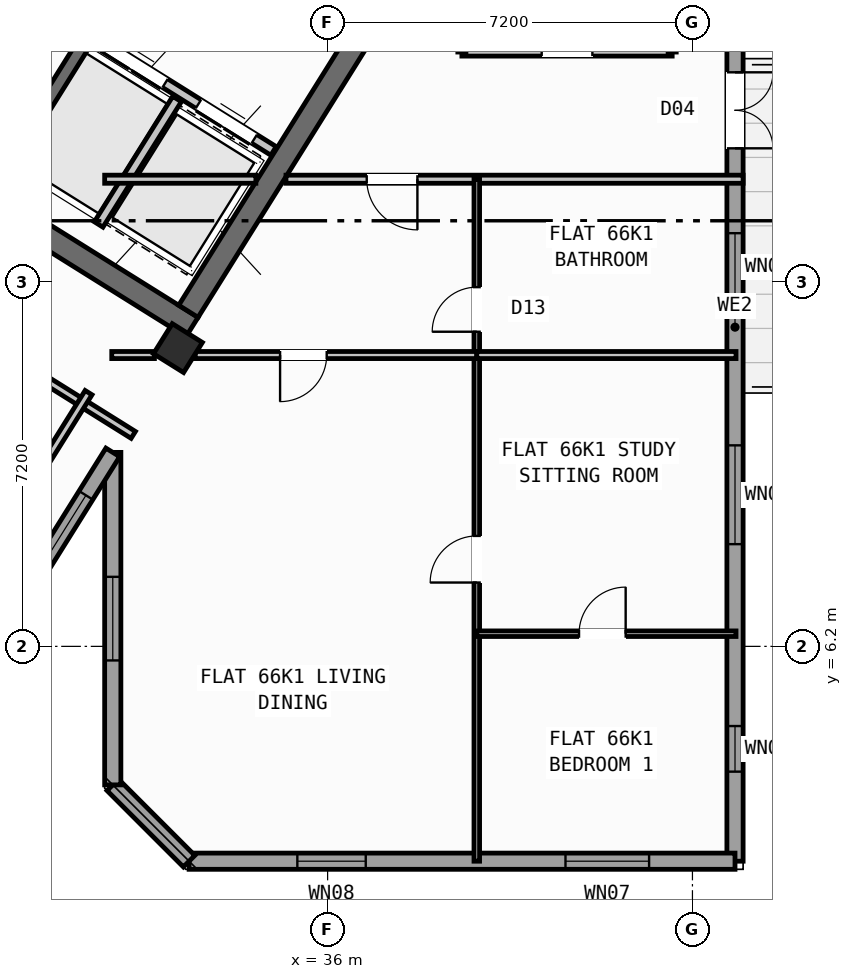
"""IFC4 building model, lengths in metres.
Left out: names, types, materials, properties, quantities, classifications, styles, units other than length and angle.
Written with IfcOpenShell. Run it as: python <this file> out.ifc"""

import sys

from ifc_helpers import new_model, si_unit, direction, frame, frame_2d, origin, origin_2d, place, context, subcontext, project, spatial, rectangle, hollow_rectangle, extrude, source, transform, mapped, element, fill, save


model = new_model("IFC4")
c1 = context("Model", 3, precision=1e-05, world=origin(), true_north=direction((0.0, 1.0)))
c2 = subcontext(c1, "Body", "Model", "MODEL_VIEW")
j1 = project(units=[si_unit("LENGTHUNIT", "METRE"), si_unit("PLANEANGLEUNIT", "RADIAN")], contexts=[c1])
p1 = place(None, origin())
s1 = spatial("IfcSite", under=j1, at=p1, CompositionType="ELEMENT")
p2 = place(p1, origin())
s2 = spatial("IfcBuilding", under=s1, at=p2, CompositionType="ELEMENT")
p3 = place(p2, frame((0.0, 0.0, 262.8)))
s3 = spatial("IfcBuildingStorey", under=s2, at=p3, CompositionType="ELEMENT", Elevation=262.8)
p4 = place(p3, frame((33.324, 12.503, 0.0), z_axis=(0.0, 0.0, 1.0), x_axis=(-0.848043529849, 0.529926571782, 0.0)))
e1 = element("IfcWall", 1, at=p4, inside=s3, PredefinedType="SHEAR", context=c2, shape_type="SweptSolid", body=[
    extrude(rectangle(XDim=13.04, YDim=0.45, at=frame_2d((6.52, 0.0))), origin(), (0.0, 0.0, 1.0), 3.35),
])
p5 = place(p3, frame((36.683, 18.304, 0.0), z_axis=(0.0, 0.0, 1.0), x_axis=(-0.529904039071, -0.848057609704, 0.0)))
e2 = element("IfcWall", 2, at=p5, inside=s3, PredefinedType="SHEAR", context=c2, shape_type="SweptSolid", body=[
    extrude(rectangle(XDim=6.475, YDim=0.45, at=frame_2d((3.238, 0.0))), origin(), (0.0, 0.0, 1.0), 3.35),
])
m1 = source(origin(), c2, "Body", "SweptSolid", [
    extrude(hollow_rectangle(XDim=0.7, YDim=0.7, WallThickness=0.028, at=origin_2d()), origin(), (0.0, 0.0, 1.0), 3.6),
])
p6 = place(p3, frame((33.046, 12.087, 0.0), z_axis=(0.0, 0.0, 1.0), x_axis=(-0.848048096156, 0.529919264233, 0.0)))
e3 = element("IfcColumn", 3, at=p6, inside=s3, PredefinedType="COLUMN", context=c2, shape_type="MappedRepresentation", body=[
    mapped(m1, transform((0.0, 0.0, 0.0), scale=1.0)),
])
p7 = place(p3, frame((44.04, 23.04, 0.0), z_axis=(0.0, 0.0, 1.0), x_axis=(0.0, -1.0, 0.0)))
e4 = element("IfcWall", 4, at=p7, inside=s3, PredefinedType="STANDARD", context=c2, shape_type="SweptSolid", body=[
    extrude(rectangle(XDim=21.08, YDim=0.32, at=frame_2d((10.54, 0.0))), origin(), (0.0, 0.0, 1.0), 3.35),
])
p8 = place(p7, frame((5.51, 0.0, 0.0)))
e5 = element("IfcOpeningElement", 5, at=p8, cuts=e4, PredefinedType="OPENING", context=c2, shape_type="SweptSolid", body=[
    extrude(rectangle(XDim=1.5, YDim=2.25, at=frame_2d((0.75, 1.125))), frame((0.0, 0.17, 0.0), z_axis=(0.0, -1.0, 0.0), x_axis=(1.0, 0.0, 0.0)), (0.0, 0.0, 1.0), 0.34),
])
p9 = place(p7, frame((1.995, 0.0, 0.9)))
e6 = element("IfcOpeningElement", 6, at=p9, cuts=e4, PredefinedType="OPENING", context=c2, shape_type="SweptSolid", body=[
    extrude(rectangle(XDim=1.65, YDim=1.45, at=frame_2d((0.825, 0.725))), frame((0.0, 0.17, 0.0), z_axis=(0.0, -1.0, 0.0), x_axis=(1.0, 0.0, 0.0)), (0.0, 0.0, 1.0), 0.34),
])
p10 = place(p7, frame((8.685, 0.0, 0.9)))
e7 = element("IfcOpeningElement", 7, at=p10, cuts=e4, PredefinedType="OPENING", context=c2, shape_type="SweptSolid", body=[
    extrude(rectangle(XDim=1.35, YDim=1.45, at=frame_2d((0.675, 0.725))), frame((0.0, 0.17, 0.0), z_axis=(0.0, -1.0, 0.0), x_axis=(1.0, 0.0, 0.0)), (0.0, 0.0, 1.0), 0.34),
])
p11 = place(p7, frame((12.873, 0.0, 0.95)))
e8 = element("IfcOpeningElement", 8, at=p11, cuts=e4, PredefinedType="OPENING", context=c2, shape_type="SweptSolid", body=[
    extrude(rectangle(XDim=1.95, YDim=1.35, at=frame_2d((0.975, 0.675))), frame((0.0, 0.17, 0.0), z_axis=(0.0, -1.0, 0.0), x_axis=(1.0, 0.0, 0.0)), (0.0, 0.0, 1.0), 0.34),
])
p12 = place(p7, frame((18.413, 0.0, 1.0)))
e9 = element("IfcOpeningElement", 9, at=p12, cuts=e4, PredefinedType="OPENING", context=c2, shape_type="SweptSolid", body=[
    extrude(rectangle(XDim=0.9, YDim=1.25, at=frame_2d((0.45, 0.625))), frame((0.0, 0.17, 0.0), z_axis=(0.0, -1.0, 0.0), x_axis=(1.0, 0.0, 0.0)), (0.0, 0.0, 1.0), 0.34),
])
p13 = place(p3, frame((44.04, 1.96, 0.0), z_axis=(0.0, 0.0, 1.0), x_axis=(-1.0, 0.0, 0.0)))
e10 = element("IfcWall", 10, at=p13, inside=s3, PredefinedType="STANDARD", context=c2, shape_type="SweptSolid", body=[
    extrude(rectangle(XDim=10.774, YDim=0.32, at=frame_2d((5.387, 0.0))), origin(), (0.0, 0.0, 1.0), 3.35),
])
p14 = place(p13, frame((1.696, 0.0, 0.9)))
e11 = element("IfcOpeningElement", 11, at=p14, cuts=e10, PredefinedType="OPENING", context=c2, shape_type="SweptSolid", body=[
    extrude(rectangle(XDim=1.65, YDim=1.45, at=frame_2d((0.825, 0.725))), frame((0.0, 0.17, 0.0), z_axis=(0.0, -1.0, 0.0), x_axis=(1.0, 0.0, 0.0)), (0.0, 0.0, 1.0), 0.34),
])
p15 = place(p13, frame((7.287, 0.0, 0.9)))
e12 = element("IfcOpeningElement", 12, at=p15, cuts=e10, PredefinedType="OPENING", context=c2, shape_type="SweptSolid", body=[
    extrude(rectangle(XDim=1.35, YDim=1.45, at=frame_2d((0.675, 0.725))), frame((0.0, 0.17, 0.0), z_axis=(0.0, -1.0, 0.0), x_axis=(1.0, 0.0, 0.0)), (0.0, 0.0, 1.0), 0.34),
])
p16 = place(p3, frame((33.266, 1.96, 0.0), z_axis=(0.0, 0.0, 1.0), x_axis=(-0.707106781187, 0.707106781187, 0.0)))
e13 = element("IfcWall", 13, at=p16, inside=s3, PredefinedType="STANDARD", context=c2, shape_type="SweptSolid", body=[
    extrude(rectangle(XDim=2.13, YDim=0.32, at=frame_2d((1.065, 0.0))), origin(), (0.0, 0.0, 1.0), 3.35),
])
p17 = place(p3, frame((31.76, 3.466, 0.0), z_axis=(0.0, 0.0, 1.0), x_axis=(0.0, 1.0, 0.0)))
e14 = element("IfcWall", 14, at=p17, inside=s3, PredefinedType="STANDARD", context=c2, shape_type="SweptSolid", body=[
    extrude(rectangle(XDim=6.562, YDim=0.32, at=frame_2d((3.281, 0.0))), origin(), (0.0, 0.0, 1.0), 3.35),
])
p18 = place(p17, frame((2.456, 0.0, 0.9)))
e15 = element("IfcOpeningElement", 15, at=p18, cuts=e14, PredefinedType="OPENING", context=c2, shape_type="SweptSolid", body=[
    extrude(rectangle(XDim=1.65, YDim=1.45, at=frame_2d((0.825, 0.725))), frame((0.0, 0.17, 0.0), z_axis=(0.0, -1.0, 0.0), x_axis=(1.0, 0.0, 0.0)), (0.0, 0.0, 1.0), 0.34),
])
p19 = place(p3, frame((31.76, 10.029, 0.0), z_axis=(0.0, 0.0, 1.0), x_axis=(-0.529930468064, -0.848041095123, 0.0)))
e16 = element("IfcWall", 16, at=p19, inside=s3, PredefinedType="STANDARD", context=c2, shape_type="SweptSolid", body=[
    extrude(rectangle(XDim=4.167, YDim=0.32, at=frame_2d((2.083, 0.0))), origin(), (0.0, 0.0, 1.0), 2.875),
])
p20 = place(p19, frame((0.999, 0.0, 0.9)))
e17 = element("IfcOpeningElement", 17, at=p20, cuts=e16, PredefinedType="OPENING", context=c2, shape_type="SweptSolid", body=[
    extrude(rectangle(XDim=1.65, YDim=1.45, at=frame_2d((0.825, 0.725))), frame((0.0, 0.17, 0.0), z_axis=(0.0, -1.0, 0.0), x_axis=(1.0, 0.0, 0.0)), (0.0, 0.0, 1.0), 0.34),
])
p21 = place(p3, frame((31.288, 18.256, 0.0), z_axis=(0.0, 0.0, 1.0), x_axis=(-0.529943379326, -0.848033026897, 0.0)))
e18 = element("IfcWall", 18, at=p21, inside=s3, PredefinedType="SHEAR", context=c2, shape_type="SweptSolid", body=[
    extrude(rectangle(XDim=3.16, YDim=0.26, at=frame_2d((1.58, 0.0))), origin(), (0.0, 0.0, 1.0), 3.35),
])
p22 = place(p3, frame((34.933, 15.978, 0.0), z_axis=(0.0, 0.0, 1.0), x_axis=(-0.848055739377, 0.529907032327, 0.0)))
e19 = element("IfcWall", 19, at=p22, inside=s3, PredefinedType="STANDARD", context=c2, shape_type="SweptSolid", body=[
    extrude(rectangle(XDim=4.298, YDim=0.2, at=frame_2d((2.149, 0.0))), origin(), (0.0, 0.0, 1.0), 3.34),
])
p23 = place(p22, frame((0.448, 0.0, 0.0)))
e20 = element("IfcOpeningElement", 20, at=p23, cuts=e19, PredefinedType="OPENING", context=c2, shape_type="SweptSolid", body=[
    extrude(rectangle(XDim=1.3, YDim=2.2, at=frame_2d((0.65, 1.1))), frame((0.0, 0.11, 0.0), z_axis=(0.0, -1.0, 0.0), x_axis=(1.0, 0.0, 0.0)), (0.0, 0.0, 1.0), 0.22),
])
p24 = place(p22, frame((2.523, 0.0, 0.0)))
e21 = element("IfcOpeningElement", 21, at=p24, cuts=e19, PredefinedType="OPENING", context=c2, shape_type="SweptSolid", body=[
    extrude(rectangle(XDim=1.45, YDim=2.25, at=frame_2d((0.725, 1.125))), frame((0.0, 0.11, 0.0), z_axis=(0.0, -1.0, 0.0), x_axis=(1.0, 0.0, 0.0)), (0.0, 0.0, 1.0), 0.22),
])
p25 = place(p3, frame((33.029, 17.003, 0.0), z_axis=(0.0, 0.0, 1.0), x_axis=(-0.529916267533, -0.848049968695, 0.0)))
e22 = element("IfcWall", 22, at=p25, inside=s3, PredefinedType="STANDARD", context=c2, shape_type="SweptSolid", body=[
    extrude(rectangle(XDim=2.92, YDim=0.2, at=frame_2d((1.46, 0.0))), origin(), (0.0, 0.0, 1.0), 3.34),
])
p26 = place(p3, frame((32.164, 10.374, 0.0), z_axis=(0.0, 0.0, 1.0), x_axis=(-0.848044107957, 0.529925646633, 0.0)))
e23 = element("IfcWall", 23, at=p26, inside=s3, PredefinedType="PARTITIONING", context=c2, shape_type="SweptSolid", body=[
    extrude(rectangle(XDim=15.57, YDim=0.16, at=frame_2d((7.785, 0.0))), origin(), (0.0, 0.0, 1.0), 3.34),
])
p27 = place(p26, frame((10.83, 0.0, 0.0)))
e24 = element("IfcOpeningElement", 24, at=p27, cuts=e23, PredefinedType="OPENING", context=c2, shape_type="SweptSolid", body=[
    extrude(rectangle(XDim=1.0, YDim=2.1, at=frame_2d((0.5, 1.05))), frame((0.0, 0.09, 0.0), z_axis=(0.0, -1.0, 0.0), x_axis=(1.0, 0.0, 0.0)), (0.0, 0.0, 1.0), 0.18),
])
p28 = place(p3, frame((31.282, 11.208, 0.0), z_axis=(0.0, 0.0, 1.0), x_axis=(-0.529938869374, -0.84803584519, 0.0)))
e25 = element("IfcWall", 25, at=p28, inside=s3, PredefinedType="PARTITIONING", context=c2, shape_type="SweptSolid", body=[
    extrude(rectangle(XDim=5.48, YDim=0.16, at=frame_2d((2.74, 0.0))), origin(), (0.0, 0.0, 1.0), 3.34),
])
p29 = place(p3, frame((31.6, 15.42, 0.0), z_axis=(0.0, 0.0, 1.0), x_axis=(1.0, 0.0, 0.0)))
e26 = element("IfcWall", 26, at=p29, inside=s3, PredefinedType="PARTITIONING", context=c2, shape_type="SweptSolid", body=[
    extrude(rectangle(XDim=2.984, YDim=0.16, at=frame_2d((1.492, 0.0))), origin(), (0.0, 0.0, 1.0), 3.34),
])
p30 = place(p3, frame((35.178, 15.42, 0.0), z_axis=(0.0, 0.0, 1.0), x_axis=(1.0, 0.0, 0.0)))
e27 = element("IfcWall", 27, at=p30, inside=s3, PredefinedType="PARTITIONING", context=c2, shape_type="SweptSolid", body=[
    extrude(rectangle(XDim=9.021, YDim=0.16, at=frame_2d((4.511, 0.0))), origin(), (0.0, 0.0, 1.0), 3.34),
])
p31 = place(p30, frame((1.594, 0.0, 0.0)))
e28 = element("IfcOpeningElement", 28, at=p31, cuts=e27, PredefinedType="OPENING", context=c2, shape_type="SweptSolid", body=[
    extrude(rectangle(XDim=1.0, YDim=2.1, at=frame_2d((0.5, 1.05))), frame((0.0, 0.09, 0.0), z_axis=(0.0, -1.0, 0.0), x_axis=(1.0, 0.0, 0.0)), (0.0, 0.0, 1.0), 0.18),
])
p32 = place(p3, frame((38.65, 17.93, 0.0), z_axis=(0.0, 0.0, 1.0), x_axis=(1.0, 0.0, 0.0)))
e29 = element("IfcWall", 29, at=p32, inside=s3, PredefinedType="PARTITIONING", context=c2, shape_type="SweptSolid", body=[
    extrude(rectangle(XDim=4.15, YDim=0.16, at=frame_2d((2.075, 0.0))), origin(), (0.0, 0.0, 1.0), 3.34),
])
p33 = place(p32, frame((1.575, 0.0, 0.0)))
e30 = element("IfcOpeningElement", 30, at=p33, cuts=e29, PredefinedType="OPENING", context=c2, shape_type="SweptSolid", body=[
    extrude(rectangle(XDim=1.0, YDim=2.1, at=frame_2d((0.5, 1.05))), frame((0.0, 0.09, 0.0), z_axis=(0.0, -1.0, 0.0), x_axis=(1.0, 0.0, 0.0)), (0.0, 0.0, 1.0), 0.18),
])
p34 = place(p3, frame((38.944, 1.96, 0.0), z_axis=(0.0, 0.0, 1.0), x_axis=(0.0, 1.0, 0.0)))
e31 = element("IfcWall", 31, at=p34, inside=s3, PredefinedType="PARTITIONING", context=c2, shape_type="SweptSolid", body=[
    extrude(rectangle(XDim=13.46, YDim=0.11, at=frame_2d((6.73, 0.0))), origin(), (0.0, 0.0, 1.0), 3.34),
])
p35 = place(p34, frame((5.5, 0.0, 0.0)))
e32 = element("IfcOpeningElement", 32, at=p35, cuts=e31, PredefinedType="OPENING", context=c2, shape_type="SweptSolid", body=[
    extrude(rectangle(XDim=0.92, YDim=2.08, at=frame_2d((0.46, 1.04))), frame((0.0, 0.065, 0.0), z_axis=(0.0, -1.0, 0.0), x_axis=(1.0, 0.0, 0.0)), (0.0, 0.0, 1.0), 0.13),
])
p36 = place(p34, frame((10.45, 0.0, 0.0)))
e33 = element("IfcOpeningElement", 33, at=p36, cuts=e31, PredefinedType="OPENING", context=c2, shape_type="SweptSolid", body=[
    extrude(rectangle(XDim=0.88, YDim=2.08, at=frame_2d((0.44, 1.04))), frame((0.0, 0.065, 0.0), z_axis=(0.0, -1.0, 0.0), x_axis=(1.0, 0.0, 0.0)), (0.0, 0.0, 1.0), 0.13),
])
p37 = place(p3, frame((31.74, 11.95, 0.0), z_axis=(0.0, 0.0, 1.0), x_axis=(1.0, 0.0, 0.0)))
e34 = element("IfcWall", 34, at=p37, inside=s3, PredefinedType="PLUMBINGWALL", context=c2, shape_type="SweptSolid", body=[
    extrude(rectangle(XDim=0.842, YDim=0.14, at=frame_2d((0.421, 0.0))), origin(), (0.0, 0.0, 1.0), 3.34),
])
p38 = place(p3, frame((33.387, 11.95, 0.0), z_axis=(0.0, 0.0, 1.0), x_axis=(1.0, 0.0, 0.0)))
e35 = element("IfcWall", 35, at=p38, inside=s3, PredefinedType="PLUMBINGWALL", context=c2, shape_type="SweptSolid", body=[
    extrude(rectangle(XDim=5.557, YDim=0.14, at=frame_2d((2.778, 0.0))), origin(), (0.0, 0.0, 1.0), 3.34),
])
p39 = place(p38, frame((1.675, 0.0, 0.0)))
e36 = element("IfcOpeningElement", 36, at=p39, cuts=e35, PredefinedType="OPENING", context=c2, shape_type="SweptSolid", body=[
    extrude(rectangle(XDim=0.92, YDim=2.08, at=frame_2d((0.46, 1.04))), frame((0.0, 0.08, 0.0), z_axis=(0.0, -1.0, 0.0), x_axis=(1.0, 0.0, 0.0)), (0.0, 0.0, 1.0), 0.16),
])
p40 = place(p3, frame((38.944, 11.95, 0.0), z_axis=(0.0, 0.0, 1.0), x_axis=(1.0, 0.0, 0.0)))
e37 = element("IfcWall", 37, at=p40, inside=s3, PredefinedType="PLUMBINGWALL", context=c2, shape_type="SweptSolid", body=[
    extrude(rectangle(XDim=5.116, YDim=0.14, at=frame_2d((2.558, 0.0))), origin(), (0.0, 0.0, 1.0), 3.34),
])
p41 = place(p3, frame((38.944, 6.45, 0.0), z_axis=(0.0, 0.0, 1.0), x_axis=(1.0, 0.0, 0.0)))
e38 = element("IfcWall", 38, at=p41, inside=s3, PredefinedType="PARTITIONING", context=c2, shape_type="SweptSolid", body=[
    extrude(rectangle(XDim=5.116, YDim=0.11, at=frame_2d((2.558, 0.0))), origin(), (0.0, 0.0, 1.0), 3.34),
])
p42 = place(p41, frame((2.018, 0.0, 0.0)))
e39 = element("IfcOpeningElement", 39, at=p42, cuts=e38, PredefinedType="OPENING", context=c2, shape_type="SweptSolid", body=[
    extrude(rectangle(XDim=0.92, YDim=2.08, at=frame_2d((0.46, 1.04))), frame((0.0, 0.065, 0.0), z_axis=(0.0, -1.0, 0.0), x_axis=(1.0, 0.0, 0.0)), (0.0, 0.0, 1.0), 0.13),
])
m2 = source(origin(), c2, "Body", "SweptSolid", [
    extrude(rectangle(XDim=1.5, YDim=2.25, at=frame_2d((0.75, 1.125))), frame((0.0, 0.025, 0.0), z_axis=(0.0, -1.0, 0.0), x_axis=(1.0, 0.0, 0.0)), (0.0, 0.0, 1.0), 0.05),
])
p43 = place(p8, origin())
e40 = element("IfcDoor", 40, at=p43, inside=s3, OperationType="DOUBLE_DOOR_SINGLE_SWING", PredefinedType="DOOR", context=c2, shape_type="MappedRepresentation", body=[
    mapped(m2, transform((0.0, 0.0, 0.0), scale=1.0)),
])
fill(e5, e40)
m3 = source(origin(), c2, "Body", "SweptSolid", [
    extrude(rectangle(XDim=1.35, YDim=1.45, at=frame_2d((0.675, 0.725))), frame((0.0, 0.03, 0.0), z_axis=(0.0, -1.0, 0.0), x_axis=(1.0, 0.0, 0.0)), (0.0, 0.0, 1.0), 0.06),
])
p44 = place(p10, origin())
e41 = element("IfcWindow", 41, at=p44, inside=s3, PartitioningType="SINGLE_PANEL", PredefinedType="WINDOW", context=c2, shape_type="MappedRepresentation", body=[
    mapped(m3, transform((0.0, 0.0, 0.0), scale=1.0)),
])
fill(e7, e41)
m4 = source(origin(), c2, "Body", "SweptSolid", [
    extrude(rectangle(XDim=1.95, YDim=1.35, at=frame_2d((0.975, 0.675))), frame((0.0, 0.03, 0.0), z_axis=(0.0, -1.0, 0.0), x_axis=(1.0, 0.0, 0.0)), (0.0, 0.0, 1.0), 0.06),
])
p45 = place(p11, origin())
e42 = element("IfcWindow", 42, at=p45, inside=s3, PartitioningType="SINGLE_PANEL", PredefinedType="WINDOW", context=c2, shape_type="MappedRepresentation", body=[
    mapped(m4, transform((0.0, 0.0, 0.0), scale=1.0)),
])
fill(e8, e42)
m5 = source(origin(), c2, "Body", "SweptSolid", [
    extrude(rectangle(XDim=0.9, YDim=1.25, at=frame_2d((0.45, 0.625))), frame((0.0, 0.03, 0.0), z_axis=(0.0, -1.0, 0.0), x_axis=(1.0, 0.0, 0.0)), (0.0, 0.0, 1.0), 0.06),
])
p46 = place(p12, origin())
e43 = element("IfcWindow", 43, at=p46, inside=s3, PartitioningType="SINGLE_PANEL", PredefinedType="WINDOW", context=c2, shape_type="MappedRepresentation", body=[
    mapped(m5, transform((0.0, 0.0, 0.0), scale=1.0)),
])
fill(e9, e43)
m6 = source(origin(), c2, "Body", "SweptSolid", [
    extrude(rectangle(XDim=1.65, YDim=1.45, at=frame_2d((0.825, 0.725))), frame((0.0, 0.03, 0.0), z_axis=(0.0, -1.0, 0.0), x_axis=(1.0, 0.0, 0.0)), (0.0, 0.0, 1.0), 0.06),
])
p47 = place(p14, origin())
e44 = element("IfcWindow", 44, at=p47, inside=s3, PartitioningType="SINGLE_PANEL", PredefinedType="WINDOW", context=c2, shape_type="MappedRepresentation", body=[
    mapped(m6, transform((0.0, 0.0, 0.0), scale=1.0)),
])
fill(e11, e44)
p48 = place(p15, origin())
e45 = element("IfcWindow", 45, at=p48, inside=s3, PartitioningType="SINGLE_PANEL", PredefinedType="WINDOW", context=c2, shape_type="MappedRepresentation", body=[
    mapped(m3, transform((0.0, 0.0, 0.0), scale=1.0)),
])
fill(e12, e45)
p49 = place(p18, origin())
e46 = element("IfcWindow", 46, at=p49, inside=s3, PartitioningType="SINGLE_PANEL", PredefinedType="WINDOW", context=c2, shape_type="MappedRepresentation", body=[
    mapped(m6, transform((0.0, 0.0, 0.0), scale=1.0)),
])
fill(e15, e46)
p50 = place(p20, origin())
e47 = element("IfcWindow", 47, at=p50, inside=s3, PartitioningType="SINGLE_PANEL", PredefinedType="WINDOW", context=c2, shape_type="MappedRepresentation", body=[
    mapped(m6, transform((0.0, 0.0, 0.0), scale=1.0)),
])
fill(e17, e47)
m7 = source(origin(), c2, "Body", "SweptSolid", [
    extrude(rectangle(XDim=1.3, YDim=2.2, at=frame_2d((0.65, 1.1))), frame((0.0, 0.025, 0.0), z_axis=(0.0, -1.0, 0.0), x_axis=(1.0, 0.0, 0.0)), (0.0, 0.0, 1.0), 0.05),
])
p51 = place(p23, origin())
e48 = element("IfcDoor", 48, at=p51, inside=s3, OperationType="DOUBLE_DOOR_SLIDING", PredefinedType="DOOR", context=c2, shape_type="MappedRepresentation", body=[
    mapped(m7, transform((0.0, 0.0, 0.0), scale=1.0)),
])
fill(e20, e48)
m8 = source(origin(), c2, "Body", "SweptSolid", [
    extrude(rectangle(XDim=1.45, YDim=2.25, at=frame_2d((0.725, 1.125))), frame((0.0, 0.025, 0.0), z_axis=(0.0, -1.0, 0.0), x_axis=(1.0, 0.0, 0.0)), (0.0, 0.0, 1.0), 0.05),
])
p52 = place(p24, origin())
e49 = element("IfcDoor", 49, at=p52, inside=s3, OperationType="DOUBLE_DOOR_SLIDING", PredefinedType="DOOR", context=c2, shape_type="MappedRepresentation", body=[
    mapped(m8, transform((0.0, 0.0, 0.0), scale=1.0)),
])
fill(e21, e49)
m9 = source(origin(), c2, "Body", "SweptSolid", [
    extrude(rectangle(XDim=1.0, YDim=2.1, at=frame_2d((0.5, 1.05))), frame((0.0, 0.025, 0.0), z_axis=(0.0, -1.0, 0.0), x_axis=(1.0, 0.0, 0.0)), (0.0, 0.0, 1.0), 0.05),
])
p53 = place(p33, origin())
e50 = element("IfcDoor", 50, at=p53, inside=s3, OperationType="SINGLE_SWING_RIGHT", PredefinedType="DOOR", context=c2, shape_type="MappedRepresentation", body=[
    mapped(m9, transform((0.0, 0.0, 0.0), scale=1.0)),
])
fill(e30, e50)
m10 = source(origin(), c2, "Body", "SweptSolid", [
    extrude(rectangle(XDim=0.92, YDim=2.08, at=frame_2d((0.46, 1.04))), frame((0.0, 0.025, 0.0), z_axis=(0.0, -1.0, 0.0), x_axis=(1.0, 0.0, 0.0)), (0.0, 0.0, 1.0), 0.05),
])
p54 = place(p35, origin())
e51 = element("IfcDoor", 51, at=p54, inside=s3, OperationType="SINGLE_SWING_LEFT", PredefinedType="DOOR", context=c2, shape_type="MappedRepresentation", body=[
    mapped(m10, transform((0.0, 0.0, 0.0), scale=1.0)),
])
fill(e32, e51)
p55 = place(p42, origin())
e52 = element("IfcDoor", 52, at=p55, inside=s3, OperationType="SINGLE_SWING_RIGHT", PredefinedType="DOOR", context=c2, shape_type="MappedRepresentation", body=[
    mapped(m10, transform((0.0, 0.0, 0.0), scale=1.0)),
])
fill(e39, e52)
p56 = place(p31, frame((1.0, 0.0, 0.0), z_axis=(0.0, 0.0, 1.0), x_axis=(-1.0, 0.0, 0.0)))
e53 = element("IfcDoor", 53, at=p56, inside=s3, OperationType="SINGLE_SWING_LEFT", PredefinedType="DOOR", context=c2, shape_type="MappedRepresentation", body=[
    mapped(m9, transform((0.0, 0.0, 0.0), scale=1.0)),
])
fill(e28, e53)
p57 = place(p39, frame((0.92, 0.0, 0.0), z_axis=(0.0, 0.0, 1.0), x_axis=(-1.0, 0.0, 0.0)))
e54 = element("IfcDoor", 54, at=p57, inside=s3, OperationType="SINGLE_SWING_RIGHT", PredefinedType="DOOR", context=c2, shape_type="MappedRepresentation", body=[
    mapped(m10, transform((0.0, 0.0, 0.0), scale=1.0)),
])
fill(e36, e54)
m11 = source(origin(), c2, "Body", "SweptSolid", [
    extrude(rectangle(XDim=0.88, YDim=2.08, at=frame_2d((0.44, 1.04))), frame((0.0, 0.025, 0.0), z_axis=(0.0, -1.0, 0.0), x_axis=(1.0, 0.0, 0.0)), (0.0, 0.0, 1.0), 0.05),
])
p58 = place(p36, origin())
e55 = element("IfcDoor", 55, at=p58, inside=s3, OperationType="SINGLE_SWING_LEFT", PredefinedType="DOOR", context=c2, shape_type="MappedRepresentation", body=[
    mapped(m11, transform((0.0, 0.0, 0.0), scale=1.0)),
])
fill(e33, e55)
save(model, sys.argv[1])
